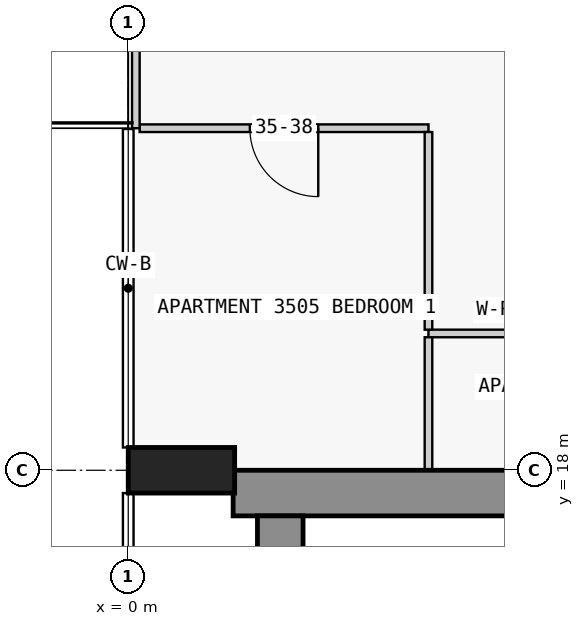
"""IFC4 building model, lengths in metres.
Left out: names, types, materials, properties, quantities, classifications, styles, units other than length and angle.
Written with IfcOpenShell. Run it as: python <this file> out.ifc"""

import sys

from ifc_helpers import new_model, si_unit, direction, frame, frame_2d, origin, origin_2d, place, context, subcontext, project, spatial, rectangle, extrude, element, fill, save


model = new_model("IFC4")
c1 = context("Model", 3, precision=1e-05, world=origin(), true_north=direction((0.0, 1.0)))
c2 = subcontext(c1, "Body", "Model", "MODEL_VIEW")
j1 = project(units=[si_unit("LENGTHUNIT", "METRE"), si_unit("PLANEANGLEUNIT", "RADIAN")], contexts=[c1])
p1 = place(None, origin())
s1 = spatial("IfcSite", under=j1, at=p1, CompositionType="ELEMENT")
p2 = place(p1, origin())
s2 = spatial("IfcBuilding", under=s1, at=p2, CompositionType="ELEMENT")
p3 = place(p2, frame((0.0, 0.0, 139.4)))
s3 = spatial("IfcBuildingStorey", under=s2, at=p3, CompositionType="ELEMENT", Elevation=139.4)
p4 = place(p3, frame((0.7, 18.0, 0.0), z_axis=(0.0, 0.0, 1.0), x_axis=(0.0, 1.0, 0.0)))
e1 = element("IfcColumn", 1, at=p4, inside=s3, PredefinedType="COLUMN", context=c2, shape_type="SweptSolid", body=[
    extrude(rectangle(XDim=0.6, YDim=1.4, at=origin_2d()), origin(), (0.0, 0.0, 1.0), 3.5),
])
p5 = place(p3, frame((1.38, 17.7, 0.0), z_axis=(0.0, 0.0, 1.0), x_axis=(1.0, 0.0, 0.0)))
e2 = element("IfcWall", 2, at=p5, inside=s3, PredefinedType="SHEAR", context=c2, shape_type="SweptSolid", body=[
    extrude(rectangle(XDim=21.12, YDim=0.6, at=frame_2d((10.56, 0.0))), origin(), (0.0, 0.0, 1.0), 3.25),
])
p6 = place(p5, frame((6.4, 0.0, 0.0)))
e3 = element("IfcOpeningElement", 3, at=p6, cuts=e2, PredefinedType="OPENING", context=c2, shape_type="SweptSolid", body=[
    extrude(rectangle(XDim=1.8, YDim=2.1, at=frame_2d((0.9, 1.05))), frame((0.0, 0.31, 0.0), z_axis=(0.0, -1.0, 0.0), x_axis=(1.0, 0.0, 0.0)), (0.0, 0.0, 1.0), 0.62),
])
p7 = place(p3, frame((2.0, 2.5, 0.0), z_axis=(0.0, 0.0, 1.0), x_axis=(0.0, 1.0, 0.0)))
e4 = element("IfcWall", 4, at=p7, inside=s3, PredefinedType="SHEAR", context=c2, shape_type="SweptSolid", body=[
    extrude(rectangle(XDim=14.9, YDim=0.6, at=frame_2d((7.45, 0.0))), origin(), (0.0, 0.0, 1.0), 3.25),
])
p8 = place(p3, frame((0.1, 22.5, 0.0), z_axis=(0.0, 0.0, 1.0), x_axis=(0.0, 1.0, 0.0)))
e5 = element("IfcWall", 5, at=p8, inside=s3, PredefinedType="STANDARD", context=c2, shape_type="SweptSolid", body=[
    extrude(rectangle(XDim=4.5, YDim=0.1, at=frame_2d((2.25, 0.0))), origin(), (0.0, 0.0, 1.0), 3.25),
])
p9 = place(p8, frame((1.05, 0.0, 0.0)))
e6 = element("IfcOpeningElement", 6, at=p9, cuts=e5, PredefinedType="OPENING", context=c2, shape_type="SweptSolid", body=[
    extrude(rectangle(XDim=2.4, YDim=2.4, at=frame_2d((1.2, 1.2))), frame((0.0, 0.06, 0.0), z_axis=(0.0, -1.0, 0.0), x_axis=(1.0, 0.0, 0.0)), (0.0, 0.0, 1.0), 0.12),
])
p10 = place(p3, frame((7.35, 19.8, 0.0), z_axis=(0.0, 0.0, 1.0), x_axis=(-1.0, 0.0, 0.0)))
e7 = element("IfcWall", 7, at=p10, inside=s3, PredefinedType="PARTITIONING", context=c2, shape_type="SweptSolid", body=[
    extrude(rectangle(XDim=3.4, YDim=0.1, at=frame_2d((1.7, 0.0))), origin(), (0.0, 0.0, 1.0), 3.25),
])
p11 = place(p10, frame((1.25, 0.0, 0.0)))
e8 = element("IfcOpeningElement", 8, at=p11, cuts=e7, PredefinedType="OPENING", context=c2, shape_type="SweptSolid", body=[
    extrude(rectangle(XDim=0.9, YDim=2.1, at=frame_2d((0.45, 1.05))), frame((0.0, 0.06, 0.0), z_axis=(0.0, -1.0, 0.0), x_axis=(1.0, 0.0, 0.0)), (0.0, 0.0, 1.0), 0.12),
])
p12 = place(p3, frame((3.95, 22.5, 0.0), z_axis=(0.0, 0.0, 1.0), x_axis=(-1.0, 0.0, 0.0)))
e9 = element("IfcWall", 9, at=p12, inside=s3, PredefinedType="PARTITIONING", context=c2, shape_type="SweptSolid", body=[
    extrude(rectangle(XDim=3.8, YDim=0.1, at=frame_2d((1.9, 0.0))), origin(), (0.0, 0.0, 1.0), 3.25),
])
p13 = place(p12, frame((1.45, 0.0, 0.0)))
e10 = element("IfcOpeningElement", 10, at=p13, cuts=e9, PredefinedType="OPENING", context=c2, shape_type="SweptSolid", body=[
    extrude(rectangle(XDim=0.9, YDim=2.1, at=frame_2d((0.45, 1.05))), frame((0.0, 0.06, 0.0), z_axis=(0.0, -1.0, 0.0), x_axis=(1.0, 0.0, 0.0)), (0.0, 0.0, 1.0), 0.12),
])
p14 = place(p3, frame((3.95, 19.75, 0.0), z_axis=(0.0, 0.0, 1.0), x_axis=(0.0, -1.0, 0.0)))
e11 = element("IfcWall", 11, at=p14, inside=s3, PredefinedType="PARTITIONING", context=c2, shape_type="SweptSolid", body=[
    extrude(rectangle(XDim=1.75, YDim=0.1, at=frame_2d((0.875, 0.0))), origin(), (0.0, 0.0, 1.0), 3.25),
])
p15 = place(p3, frame((3.95, 19.85, 0.0), z_axis=(0.0, 0.0, 1.0), x_axis=(0.0, 1.0, 0.0)))
e12 = element("IfcWall", 12, at=p15, inside=s3, PredefinedType="PARTITIONING", context=c2, shape_type="SweptSolid", body=[
    extrude(rectangle(XDim=2.6, YDim=0.1, at=frame_2d((1.3, 0.0))), origin(), (0.0, 0.0, 1.0), 3.25),
])
p16 = place(p13, origin())
e13 = element("IfcDoor", 13, at=p16, inside=s3, OperationType="SINGLE_SWING_LEFT", PredefinedType="DOOR", context=c2, shape_type="SweptSolid", body=[
    extrude(rectangle(XDim=0.9, YDim=2.1, at=frame_2d((0.45, 1.05))), frame((0.0, 0.025, 0.0), z_axis=(0.0, -1.0, 0.0), x_axis=(1.0, 0.0, 0.0)), (0.0, 0.0, 1.0), 0.05),
])
fill(e10, e13)
save(model, sys.argv[1])
